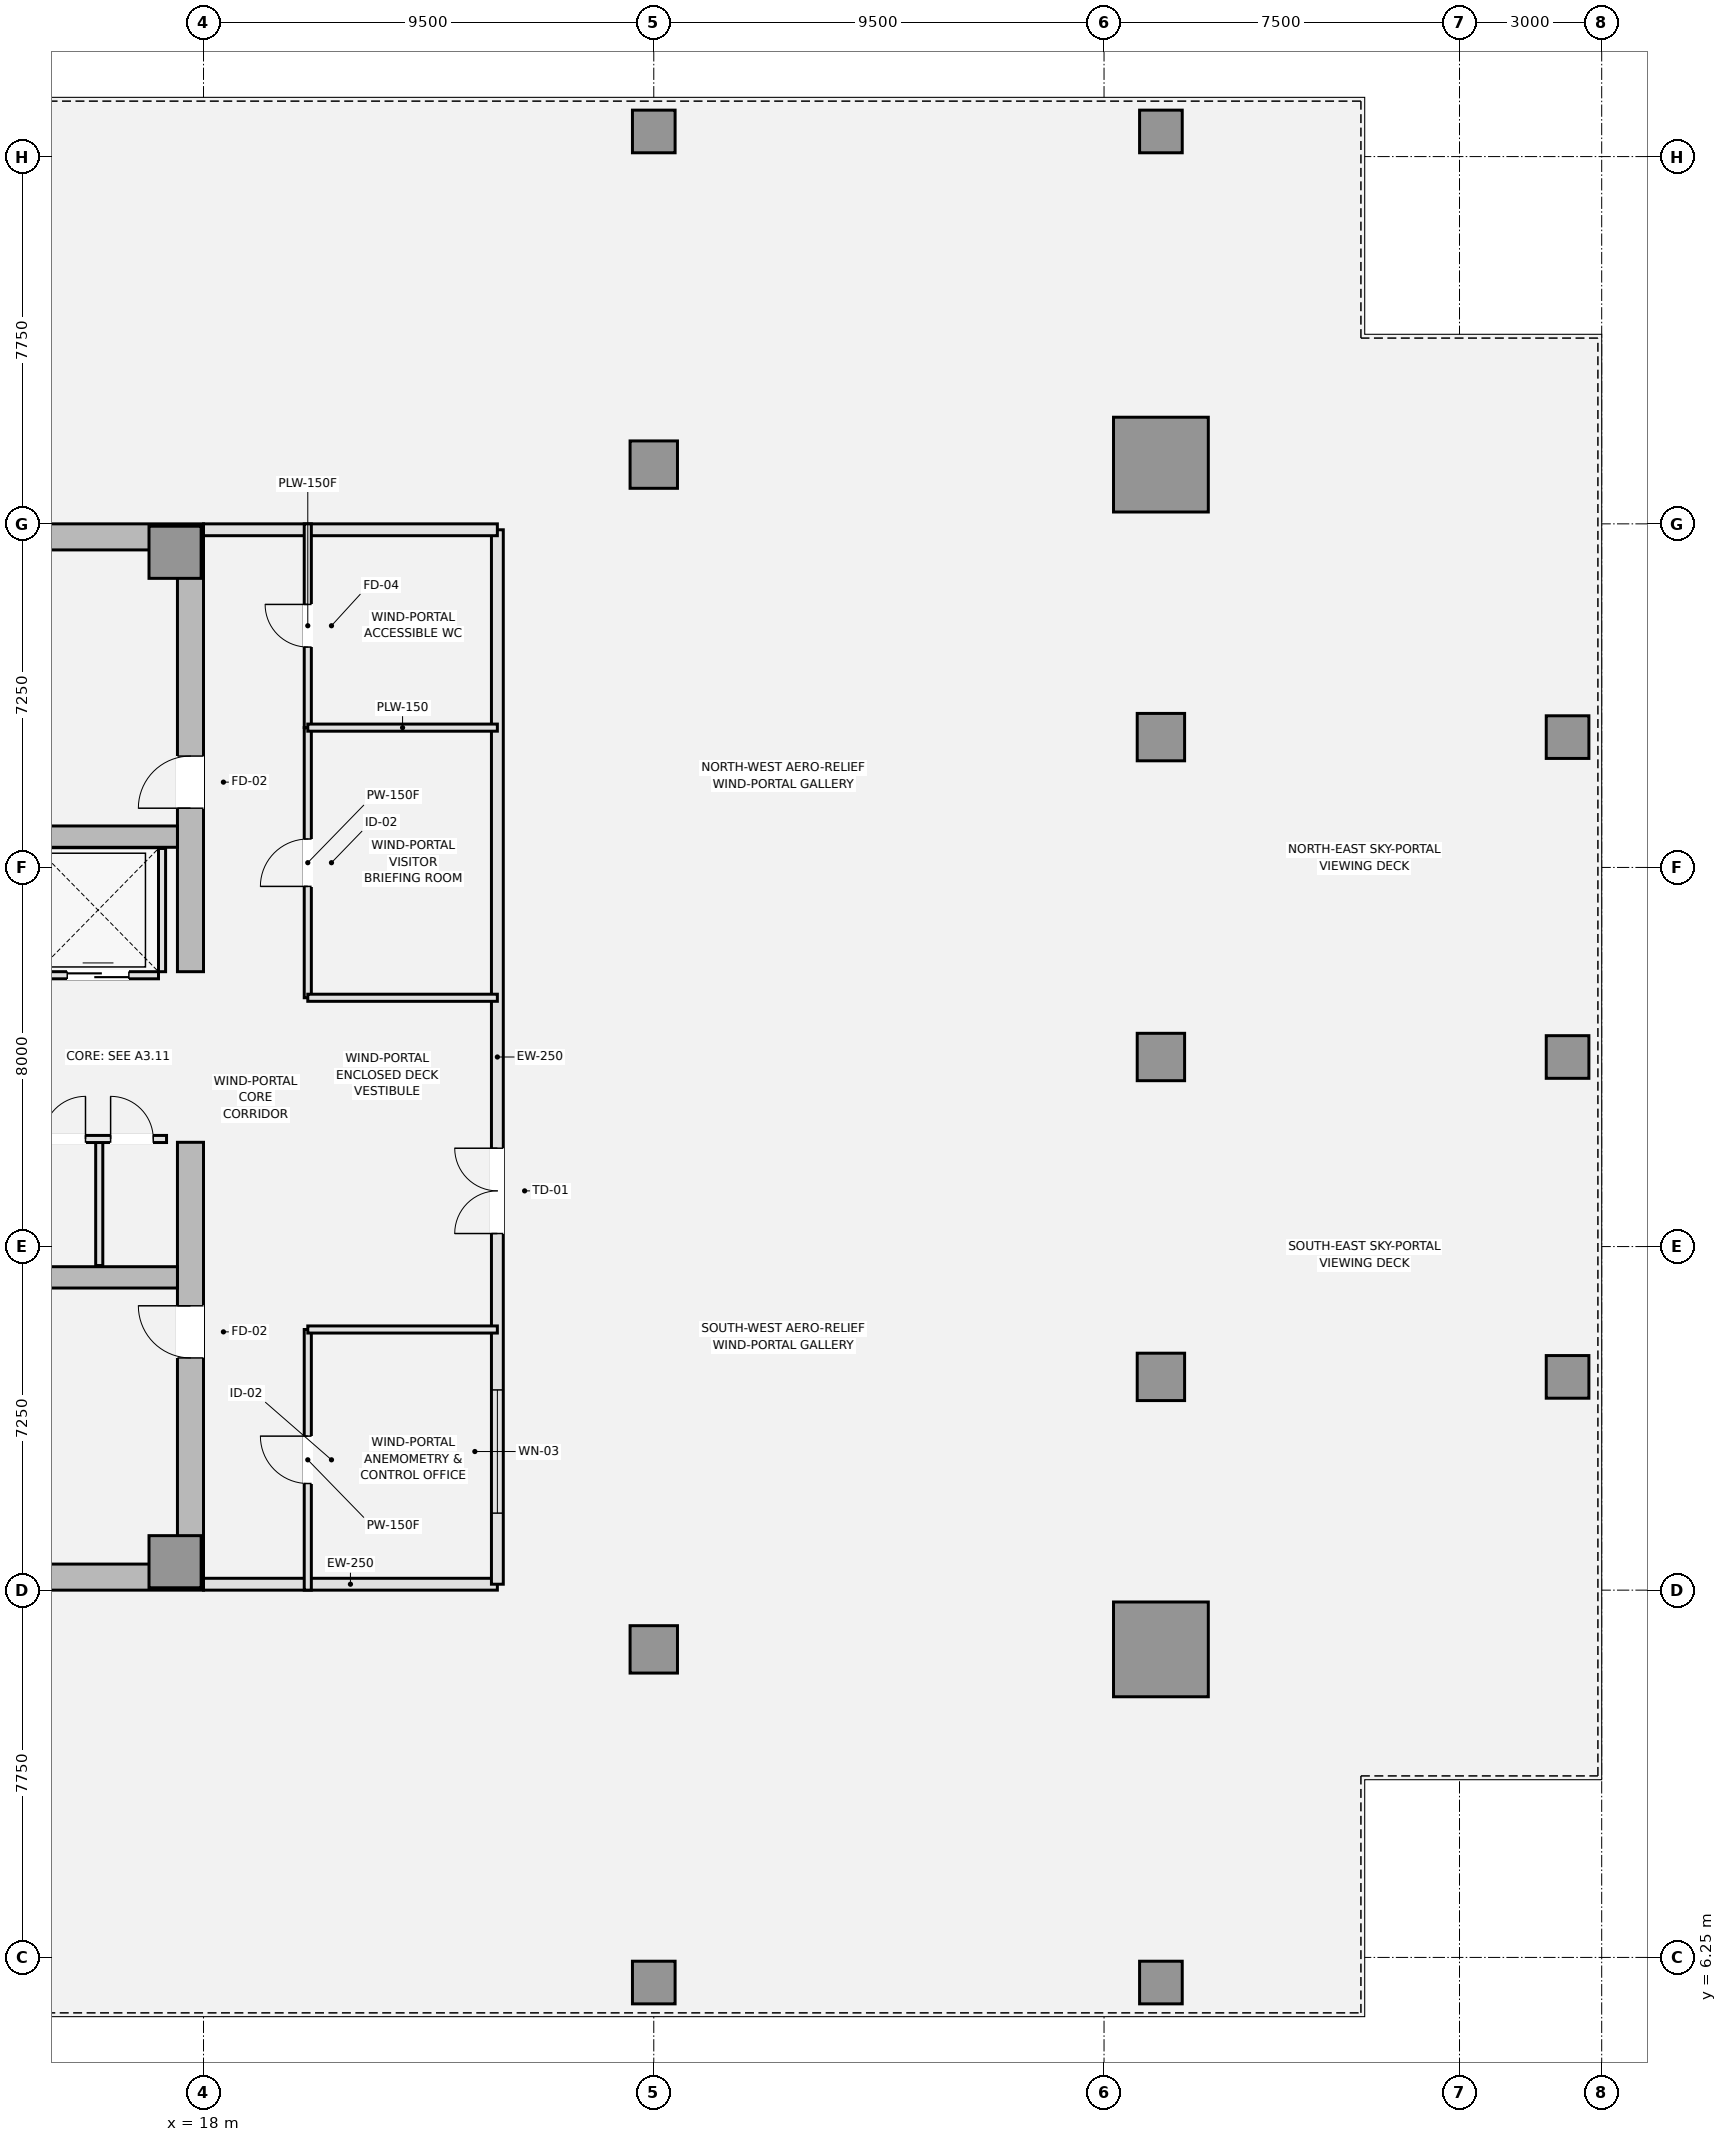
"""IFC4 building model, lengths in metres.
Left out: names, types, materials, properties, quantities, classifications, styles, units other than length and angle.
Written with IfcOpenShell. Run it as: python <this file> out.ifc"""

import sys

from ifc_helpers import new_model, si_unit, direction, frame, frame_2d, origin, origin_2d, place, context, subcontext, project, spatial, rectangle, extrude, element, fill, save


model = new_model("IFC4")
c1 = context("Model", 3, precision=1e-05, world=origin(), true_north=direction((0.0, 1.0)))
c2 = subcontext(c1, "Body", "Model", "MODEL_VIEW")
j1 = project(units=[si_unit("LENGTHUNIT", "METRE"), si_unit("PLANEANGLEUNIT", "RADIAN")], contexts=[c1])
p1 = place(None, origin())
s1 = spatial("IfcSite", under=j1, at=p1, CompositionType="ELEMENT")
p2 = place(p1, origin())
s2 = spatial("IfcBuilding", under=s1, at=p2, CompositionType="ELEMENT")
p3 = place(p2, frame((0.0, 0.0, 178.05)))
s3 = spatial("IfcBuildingStorey", under=s2, at=p3, CompositionType="ELEMENT", Elevation=178.05)
for number, where, z_axis, x_axis in (
    (1, (4.5, 14.275, 0.0), (0.0, 0.0, 1.0), (1.0, 0.0, 0.0)),
    (2, (4.5, 36.225, 0.0), (0.0, 0.0, 1.0), (1.0, 0.0, 0.0)),
):
    element("IfcWall", number, at=place(p3, frame(where, z_axis=z_axis, x_axis=x_axis)), inside=s3, PredefinedType="SHEAR", context=c2, shape_type="SweptSolid", body=[
        extrude(rectangle(XDim=13.5, YDim=0.55, at=frame_2d((6.75, 0.0))), origin(), (0.0, 0.0, 1.0), 5.6),
    ])
p4 = place(p3, frame((17.725, 14.55, 0.0), z_axis=(0.0, 0.0, 1.0), x_axis=(0.0, 1.0, 0.0)))
e3 = element("IfcWall", 3, at=p4, inside=s3, PredefinedType="SHEAR", context=c2, shape_type="SweptSolid", body=[
    extrude(rectangle(XDim=8.9, YDim=0.55, at=frame_2d((4.45, 0.0))), origin(), (0.0, 0.0, 1.0), 5.6),
])
p5 = place(p4, frame((4.35, 0.0, 0.0)))
e4 = element("IfcOpeningElement", 4, at=p5, cuts=e3, PredefinedType="OPENING", context=c2, shape_type="SweptSolid", body=[
    extrude(rectangle(XDim=1.1, YDim=2.15, at=frame_2d((0.55, 1.075))), frame((0.0, 0.285, 0.0), z_axis=(0.0, -1.0, 0.0), x_axis=(1.0, 0.0, 0.0)), (0.0, 0.0, 1.0), 0.57),
])
p6 = place(p3, frame((17.725, 27.05, 0.0), z_axis=(0.0, 0.0, 1.0), x_axis=(0.0, 1.0, 0.0)))
e5 = element("IfcWall", 5, at=p6, inside=s3, PredefinedType="SHEAR", context=c2, shape_type="SweptSolid", body=[
    extrude(rectangle(XDim=8.9, YDim=0.55, at=frame_2d((4.45, 0.0))), origin(), (0.0, 0.0, 1.0), 5.6),
])
p7 = place(p6, frame((3.45, 0.0, 0.0)))
e6 = element("IfcOpeningElement", 6, at=p7, cuts=e5, PredefinedType="OPENING", context=c2, shape_type="SweptSolid", body=[
    extrude(rectangle(XDim=1.1, YDim=2.15, at=frame_2d((0.55, 1.075))), frame((0.0, 0.285, 0.0), z_axis=(0.0, -1.0, 0.0), x_axis=(1.0, 0.0, 0.0)), (0.0, 0.0, 1.0), 0.57),
])
for number, where, z_axis, x_axis in (
    (7, (5.05, 20.6, 0.0), (0.0, 0.0, 1.0), (1.0, 0.0, 0.0)),
    (8, (5.05, 29.9, 0.0), (0.0, 0.0, 1.0), (1.0, 0.0, 0.0)),
):
    element("IfcWall", number, at=place(p3, frame(where, z_axis=z_axis, x_axis=x_axis)), inside=s3, PredefinedType="SHEAR", context=c2, shape_type="SweptSolid", body=[
        extrude(rectangle(XDim=12.4, YDim=0.45, at=frame_2d((6.2, 0.0))), origin(), (0.0, 0.0, 1.0), 5.6),
    ])
for number, where, z_axis, x_axis in (
    (9, (17.4, 14.6, 0.0), (0.0, 0.0, 1.0), (1.0, 0.0, 0.0)),
    (10, (17.4, 35.9, 0.0), (0.0, 0.0, 1.0), (1.0, 0.0, 0.0)),
):
    element("IfcColumn", number, at=place(p3, frame(where, z_axis=z_axis, x_axis=x_axis)), inside=s3, PredefinedType="PILASTER", context=c2, shape_type="SweptSolid", body=[
        extrude(rectangle(XDim=1.1, YDim=1.1, at=origin_2d()), origin(), (0.0, 0.0, 1.0), 5.6),
    ])
for number, where, z_axis, x_axis in (
    (11, (38.2, 12.75, 0.0), (0.0, 0.0, 1.0), (1.0, 0.0, 0.0)),
    (12, (38.2, 37.75, 0.0), (0.0, 0.0, 1.0), (1.0, 0.0, 0.0)),
):
    element("IfcColumn", number, at=place(p3, frame(where, z_axis=z_axis, x_axis=x_axis)), inside=s3, PredefinedType="COLUMN", context=c2, shape_type="SweptSolid", body=[
        extrude(rectangle(XDim=2.0, YDim=2.0, at=origin_2d()), origin(), (0.0, 0.0, 1.0), 5.6),
    ])
for number, where, z_axis, x_axis in (
    (13, (27.5, 12.75, 0.0), (0.0, 0.0, 1.0), (1.0, 0.0, 0.0)),
    (14, (27.5, 37.75, 0.0), (0.0, 0.0, 1.0), (1.0, 0.0, 0.0)),
    (15, (38.2, 18.5, 0.0), (0.0, 0.0, 1.0), (1.0, 0.0, 0.0)),
    (16, (38.2, 25.25, 0.0), (0.0, 0.0, 1.0), (1.0, 0.0, 0.0)),
    (17, (38.2, 32.0, 0.0), (0.0, 0.0, 1.0), (1.0, 0.0, 0.0)),
):
    element("IfcColumn", number, at=place(p3, frame(where, z_axis=z_axis, x_axis=x_axis)), inside=s3, PredefinedType="COLUMN", context=c2, shape_type="SweptSolid", body=[
        extrude(rectangle(XDim=1.0, YDim=1.0, at=origin_2d()), origin(), (0.0, 0.0, 1.0), 5.6),
    ])
for number, where, z_axis, x_axis in (
    (18, (46.78, 18.5, 0.0), (0.0, 0.0, 1.0), (1.0, 0.0, 0.0)),
    (19, (46.78, 25.25, 0.0), (0.0, 0.0, 1.0), (1.0, 0.0, 0.0)),
    (20, (46.78, 32.0, 0.0), (0.0, 0.0, 1.0), (1.0, 0.0, 0.0)),
    (21, (27.5, 5.72, 0.0), (0.0, 0.0, 1.0), (1.0, 0.0, 0.0)),
    (22, (38.2, 5.72, 0.0), (0.0, 0.0, 1.0), (1.0, 0.0, 0.0)),
    (23, (27.5, 44.78, 0.0), (0.0, 0.0, 1.0), (1.0, 0.0, 0.0)),
    (24, (38.2, 44.78, 0.0), (0.0, 0.0, 1.0), (1.0, 0.0, 0.0)),
):
    element("IfcColumn", number, at=place(p3, frame(where, z_axis=z_axis, x_axis=x_axis)), inside=s3, PredefinedType="COLUMN", context=c2, shape_type="SweptSolid", body=[
        extrude(rectangle(XDim=0.9, YDim=0.9, at=origin_2d()), origin(), (0.0, 0.0, 1.0), 5.6),
    ])
p8 = place(p3, frame((18.0, 14.125, 0.0), z_axis=(0.0, 0.0, 1.0), x_axis=(1.0, 0.0, 0.0)))
e25 = element("IfcWall", 25, at=p8, inside=s3, PredefinedType="SOLIDWALL", context=c2, shape_type="SweptSolid", body=[
    extrude(rectangle(XDim=6.2, YDim=0.25, at=frame_2d((3.1, 0.0))), origin(), (0.0, 0.0, 1.0), 5.42),
])
p9 = place(p3, frame((24.2, 14.125, 0.0), z_axis=(0.0, 0.0, 1.0), x_axis=(0.0, 1.0, 0.0)))
e26 = element("IfcWall", 26, at=p9, inside=s3, PredefinedType="SOLIDWALL", context=c2, shape_type="SweptSolid", body=[
    extrude(rectangle(XDim=22.25, YDim=0.25, at=frame_2d((11.125, 0.0))), origin(), (0.0, 0.0, 1.0), 4.97),
])
p10 = place(p9, frame((7.4, 0.0, 0.0)))
e27 = element("IfcOpeningElement", 27, at=p10, cuts=e26, PredefinedType="OPENING", context=c2, shape_type="SweptSolid", body=[
    extrude(rectangle(XDim=1.8, YDim=2.2, at=frame_2d((0.9, 1.1))), frame((0.0, 0.135, 0.0), z_axis=(0.0, -1.0, 0.0), x_axis=(1.0, 0.0, 0.0)), (0.0, 0.0, 1.0), 0.27),
])
p11 = place(p9, frame((1.5, 0.0, 0.9)))
e28 = element("IfcOpeningElement", 28, at=p11, cuts=e26, PredefinedType="OPENING", context=c2, shape_type="SweptSolid", body=[
    extrude(rectangle(XDim=2.6, YDim=2.2, at=frame_2d((1.3, 1.1))), frame((0.0, 0.135, 0.0), z_axis=(0.0, -1.0, 0.0), x_axis=(1.0, 0.0, 0.0)), (0.0, 0.0, 1.0), 0.27),
])
p12 = place(p3, frame((24.2, 36.375, 0.0), z_axis=(0.0, 0.0, 1.0), x_axis=(-1.0, 0.0, 0.0)))
e29 = element("IfcWall", 29, at=p12, inside=s3, PredefinedType="SOLIDWALL", context=c2, shape_type="SweptSolid", body=[
    extrude(rectangle(XDim=6.2, YDim=0.25, at=frame_2d((3.1, 0.0))), origin(), (0.0, 0.0, 1.0), 5.42),
])
p13 = place(p3, frame((14.5, 26.975, 0.0), z_axis=(0.0, 0.0, 1.0), x_axis=(1.0, 0.0, 0.0)))
e30 = element("IfcWall", 30, at=p13, inside=s3, PredefinedType="PARTITIONING", context=c2, shape_type="SweptSolid", body=[
    extrude(rectangle(XDim=2.55, YDim=0.15, at=frame_2d((1.275, 0.0))), origin(), (0.0, 0.0, 1.0), 5.42),
])
p14 = place(p13, frame((0.625, 0.0, 0.0)))
e31 = element("IfcOpeningElement", 31, at=p14, cuts=e30, PredefinedType="OPENING", context=c2, shape_type="SweptSolid", body=[
    extrude(rectangle(XDim=1.3, YDim=2.2, at=frame_2d((0.65, 1.1))), frame((0.0, 0.085, 0.0), z_axis=(0.0, -1.0, 0.0), x_axis=(1.0, 0.0, 0.0)), (0.0, 0.0, 1.0), 0.17),
])
p15 = place(p3, frame((17.125, 27.05, 0.0), z_axis=(0.0, 0.0, 1.0), x_axis=(0.0, 1.0, 0.0)))
e32 = element("IfcWall", 32, at=p15, inside=s3, PredefinedType="PARTITIONING", context=c2, shape_type="SweptSolid", body=[
    extrude(rectangle(XDim=2.6, YDim=0.15, at=frame_2d((1.3, 0.0))), origin(), (0.0, 0.0, 1.0), 5.42),
])
p16 = place(p3, frame((15.8, 20.85, 0.0), z_axis=(0.0, 0.0, 1.0), x_axis=(0.0, 1.0, 0.0)))
e33 = element("IfcWall", 33, at=p16, inside=s3, PredefinedType="PARTITIONING", context=c2, shape_type="SweptSolid", body=[
    extrude(rectangle(XDim=2.67, YDim=0.15, at=frame_2d((1.335, 0.0))), origin(), (0.0, 0.0, 1.0), 5.42),
])
p17 = place(p3, frame((14.33, 23.52, 0.0), z_axis=(0.0, 0.0, 1.0), x_axis=(1.0, 0.0, 0.0)))
e34 = element("IfcWall", 34, at=p17, inside=s3, PredefinedType="PARTITIONING", context=c2, shape_type="SweptSolid", body=[
    extrude(rectangle(XDim=2.89, YDim=0.15, at=frame_2d((1.445, 0.0))), origin(), (0.0, 0.0, 1.0), 5.42),
])
p18 = place(p17, frame((0.28, 0.0, 0.0)))
e35 = element("IfcOpeningElement", 35, at=p18, cuts=e34, PredefinedType="OPENING", context=c2, shape_type="SweptSolid", body=[
    extrude(rectangle(XDim=0.9, YDim=2.1, at=frame_2d((0.45, 1.05))), frame((0.0, 0.085, 0.0), z_axis=(0.0, -1.0, 0.0), x_axis=(1.0, 0.0, 0.0)), (0.0, 0.0, 1.0), 0.17),
])
p19 = place(p17, frame((1.71, 0.0, 0.0)))
e36 = element("IfcOpeningElement", 36, at=p19, cuts=e34, PredefinedType="OPENING", context=c2, shape_type="SweptSolid", body=[
    extrude(rectangle(XDim=0.9, YDim=2.1, at=frame_2d((0.45, 1.05))), frame((0.0, 0.085, 0.0), z_axis=(0.0, -1.0, 0.0), x_axis=(1.0, 0.0, 0.0)), (0.0, 0.0, 1.0), 0.17),
])
p20 = place(p3, frame((20.2, 14.0, 0.0), z_axis=(0.0, 0.0, 1.0), x_axis=(0.0, 1.0, 0.0)))
e37 = element("IfcWall", 37, at=p20, inside=s3, PredefinedType="PARTITIONING", context=c2, shape_type="SweptSolid", body=[
    extrude(rectangle(XDim=5.5, YDim=0.15, at=frame_2d((2.75, 0.0))), origin(), (0.0, 0.0, 1.0), 5.42),
])
p21 = place(p20, frame((2.25, 0.0, 0.0)))
e38 = element("IfcOpeningElement", 38, at=p21, cuts=e37, PredefinedType="OPENING", context=c2, shape_type="SweptSolid", body=[
    extrude(rectangle(XDim=1.0, YDim=2.15, at=frame_2d((0.5, 1.075))), frame((0.0, 0.085, 0.0), z_axis=(0.0, -1.0, 0.0), x_axis=(1.0, 0.0, 0.0)), (0.0, 0.0, 1.0), 0.17),
])
p22 = place(p3, frame((20.2, 26.5, 0.0), z_axis=(0.0, 0.0, 1.0), x_axis=(0.0, 1.0, 0.0)))
e39 = element("IfcWall", 39, at=p22, inside=s3, PredefinedType="PARTITIONING", context=c2, shape_type="SweptSolid", body=[
    extrude(rectangle(XDim=5.7, YDim=0.15, at=frame_2d((2.85, 0.0))), origin(), (0.0, 0.0, 1.0), 5.42),
])
p23 = place(p22, frame((2.35, 0.0, 0.0)))
e40 = element("IfcOpeningElement", 40, at=p23, cuts=e39, PredefinedType="OPENING", context=c2, shape_type="SweptSolid", body=[
    extrude(rectangle(XDim=1.0, YDim=2.15, at=frame_2d((0.5, 1.075))), frame((0.0, 0.085, 0.0), z_axis=(0.0, -1.0, 0.0), x_axis=(1.0, 0.0, 0.0)), (0.0, 0.0, 1.0), 0.17),
])
p24 = place(p3, frame((20.2, 32.2, 0.0), z_axis=(0.0, 0.0, 1.0), x_axis=(0.0, 1.0, 0.0)))
e41 = element("IfcWall", 41, at=p24, inside=s3, PredefinedType="PLUMBINGWALL", context=c2, shape_type="SweptSolid", body=[
    extrude(rectangle(XDim=4.3, YDim=0.15, at=frame_2d((2.15, 0.0))), origin(), (0.0, 0.0, 1.0), 5.42),
])
p25 = place(p24, frame((1.7, 0.0, 0.0)))
e42 = element("IfcOpeningElement", 42, at=p25, cuts=e41, PredefinedType="OPENING", context=c2, shape_type="SweptSolid", body=[
    extrude(rectangle(XDim=0.9, YDim=2.1, at=frame_2d((0.45, 1.05))), frame((0.0, 0.085, 0.0), z_axis=(0.0, -1.0, 0.0), x_axis=(1.0, 0.0, 0.0)), (0.0, 0.0, 1.0), 0.17),
])
for number, where, z_axis, x_axis in (
    (43, (20.2, 19.5, 0.0), (0.0, 0.0, 1.0), (1.0, 0.0, 0.0)),
    (44, (20.2, 26.5, 0.0), (0.0, 0.0, 1.0), (1.0, 0.0, 0.0)),
):
    element("IfcWall", number, at=place(p3, frame(where, z_axis=z_axis, x_axis=x_axis)), inside=s3, PredefinedType="PARTITIONING", context=c2, shape_type="SweptSolid", body=[
        extrude(rectangle(XDim=4.0, YDim=0.15, at=frame_2d((2.0, 0.0))), origin(), (0.0, 0.0, 1.0), 5.42),
    ])
p26 = place(p3, frame((20.2, 32.2, 0.0), z_axis=(0.0, 0.0, 1.0), x_axis=(1.0, 0.0, 0.0)))
e45 = element("IfcWall", 45, at=p26, inside=s3, PredefinedType="PLUMBINGWALL", context=c2, shape_type="SweptSolid", body=[
    extrude(rectangle(XDim=4.0, YDim=0.15, at=frame_2d((2.0, 0.0))), origin(), (0.0, 0.0, 1.0), 5.42),
])
p27 = place(p10, frame((1.8, 0.0, 0.0), z_axis=(0.0, 0.0, 1.0), x_axis=(-1.0, 0.0, 0.0)))
e46 = element("IfcDoor", 46, at=p27, inside=s3, OperationType="DOUBLE_DOOR_SINGLE_SWING", PredefinedType="DOOR", context=c2, shape_type="SweptSolid", body=[
    extrude(rectangle(XDim=1.8, YDim=2.2, at=frame_2d((0.9, 1.1))), frame((0.0, 0.025, 0.0), z_axis=(0.0, -1.0, 0.0), x_axis=(1.0, 0.0, 0.0)), (0.0, 0.0, 1.0), 0.05),
])
fill(e27, e46)
p28 = place(p11, origin())
e47 = element("IfcWindow", 47, at=p28, inside=s3, PartitioningType="SINGLE_PANEL", PredefinedType="WINDOW", context=c2, shape_type="SweptSolid", body=[
    extrude(rectangle(XDim=2.6, YDim=2.2, at=frame_2d((1.3, 1.1))), frame((0.0, 0.03, 0.0), z_axis=(0.0, -1.0, 0.0), x_axis=(1.0, 0.0, 0.0)), (0.0, 0.0, 1.0), 0.06),
])
fill(e28, e47)
p29 = place(p14, origin())
e48 = element("IfcDoor", 48, at=p29, inside=s3, OperationType="DOUBLE_DOOR_SLIDING", PredefinedType="DOOR", context=c2, shape_type="SweptSolid", body=[
    extrude(rectangle(XDim=1.3, YDim=2.2, at=frame_2d((0.65, 1.1))), frame((0.0, 0.025, 0.0), z_axis=(0.0, -1.0, 0.0), x_axis=(1.0, 0.0, 0.0)), (0.0, 0.0, 1.0), 0.05),
])
fill(e31, e48)
p30 = place(p5, origin())
e49 = element("IfcDoor", 49, at=p30, inside=s3, OperationType="SINGLE_SWING_RIGHT", PredefinedType="DOOR", context=c2, shape_type="SweptSolid", body=[
    extrude(rectangle(XDim=1.1, YDim=2.15, at=frame_2d((0.55, 1.075))), frame((0.0, 0.025, 0.0), z_axis=(0.0, -1.0, 0.0), x_axis=(1.0, 0.0, 0.0)), (0.0, 0.0, 1.0), 0.05),
])
fill(e4, e49)
p31 = place(p7, origin())
e50 = element("IfcDoor", 50, at=p31, inside=s3, OperationType="SINGLE_SWING_LEFT", PredefinedType="DOOR", context=c2, shape_type="SweptSolid", body=[
    extrude(rectangle(XDim=1.1, YDim=2.15, at=frame_2d((0.55, 1.075))), frame((0.0, 0.025, 0.0), z_axis=(0.0, -1.0, 0.0), x_axis=(1.0, 0.0, 0.0)), (0.0, 0.0, 1.0), 0.05),
])
fill(e6, e50)
p32 = place(p18, origin())
e51 = element("IfcDoor", 51, at=p32, inside=s3, OperationType="SINGLE_SWING_RIGHT", PredefinedType="DOOR", context=c2, shape_type="SweptSolid", body=[
    extrude(rectangle(XDim=0.9, YDim=2.1, at=frame_2d((0.45, 1.05))), frame((0.0, 0.025, 0.0), z_axis=(0.0, -1.0, 0.0), x_axis=(1.0, 0.0, 0.0)), (0.0, 0.0, 1.0), 0.05),
])
fill(e35, e51)
p33 = place(p19, origin())
e52 = element("IfcDoor", 52, at=p33, inside=s3, OperationType="SINGLE_SWING_LEFT", PredefinedType="DOOR", context=c2, shape_type="SweptSolid", body=[
    extrude(rectangle(XDim=0.9, YDim=2.1, at=frame_2d((0.45, 1.05))), frame((0.0, 0.025, 0.0), z_axis=(0.0, -1.0, 0.0), x_axis=(1.0, 0.0, 0.0)), (0.0, 0.0, 1.0), 0.05),
])
fill(e36, e52)
p34 = place(p21, origin())
e53 = element("IfcDoor", 53, at=p34, inside=s3, OperationType="SINGLE_SWING_RIGHT", PredefinedType="DOOR", context=c2, shape_type="SweptSolid", body=[
    extrude(rectangle(XDim=1.0, YDim=2.15, at=frame_2d((0.5, 1.075))), frame((0.0, 0.025, 0.0), z_axis=(0.0, -1.0, 0.0), x_axis=(1.0, 0.0, 0.0)), (0.0, 0.0, 1.0), 0.05),
])
fill(e38, e53)
p35 = place(p23, origin())
e54 = element("IfcDoor", 54, at=p35, inside=s3, OperationType="SINGLE_SWING_LEFT", PredefinedType="DOOR", context=c2, shape_type="SweptSolid", body=[
    extrude(rectangle(XDim=1.0, YDim=2.15, at=frame_2d((0.5, 1.075))), frame((0.0, 0.025, 0.0), z_axis=(0.0, -1.0, 0.0), x_axis=(1.0, 0.0, 0.0)), (0.0, 0.0, 1.0), 0.05),
])
fill(e40, e54)
p36 = place(p25, origin())
e55 = element("IfcDoor", 55, at=p36, inside=s3, OperationType="SINGLE_SWING_RIGHT", PredefinedType="DOOR", context=c2, shape_type="SweptSolid", body=[
    extrude(rectangle(XDim=0.9, YDim=2.1, at=frame_2d((0.45, 1.05))), frame((0.0, 0.025, 0.0), z_axis=(0.0, -1.0, 0.0), x_axis=(1.0, 0.0, 0.0)), (0.0, 0.0, 1.0), 0.05),
])
fill(e42, e55)
save(model, sys.argv[1])
